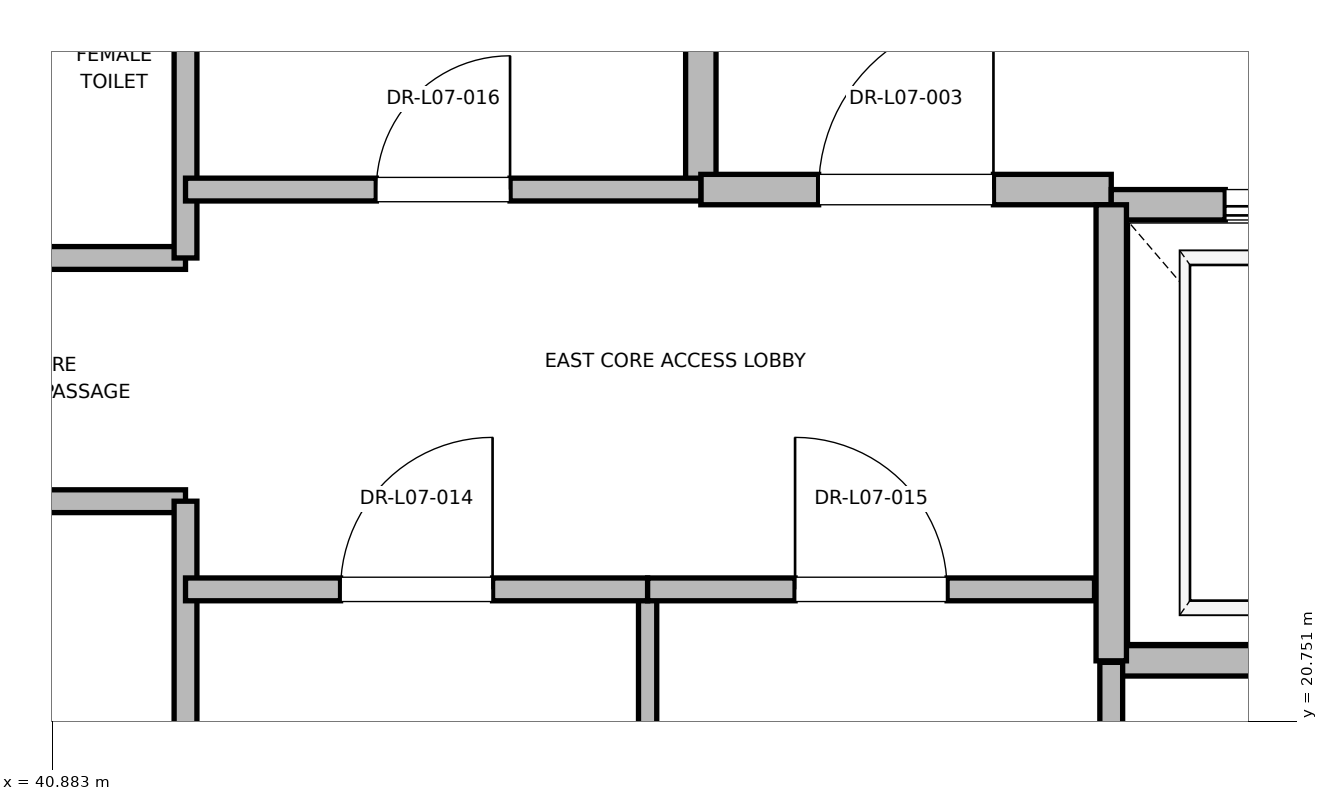
"""IFC4 building model, lengths in metres.
Left out: names, types, materials, properties, quantities, classifications, styles, units other than length and angle.
Written with IfcOpenShell. Run it as: python <this file> out.ifc"""

import sys

from ifc_helpers import new_model, si_unit, direction, frame, frame_2d, origin, place, context, subcontext, project, spatial, rectangle, extrude, element, fill, save


model = new_model("IFC4")
c1 = context("Model", 3, precision=1e-05, world=origin(), true_north=direction((0.0, 1.0)))
c2 = subcontext(c1, "Body", "Model", "MODEL_VIEW")
j1 = project(units=[si_unit("LENGTHUNIT", "METRE"), si_unit("PLANEANGLEUNIT", "RADIAN")], contexts=[c1])
p1 = place(None, origin())
s1 = spatial("IfcSite", under=j1, at=p1, CompositionType="ELEMENT")
p2 = place(p1, origin())
s2 = spatial("IfcBuilding", under=s1, at=p2, CompositionType="ELEMENT")
p3 = place(p2, frame((0.0, 0.0, 35.6)))
s3 = spatial("IfcBuildingStorey", under=s2, at=p3, CompositionType="ELEMENT", Elevation=35.6)
p4 = place(p3, frame((45.15, 24.25, 0.0), z_axis=(0.0, 0.0, 1.0), x_axis=(0.0, 1.0, 0.0)))
e1 = element("IfcWall", 1, at=p4, inside=s3, PredefinedType="PARTITIONING", context=c2, shape_type="SweptSolid", body=[
    extrude(rectangle(XDim=3.37, YDim=0.2, at=frame_2d((1.685, 0.0))), origin(), (0.0, 0.0, 1.0), 3.76),
])
p5 = place(p3, frame((45.15, 24.25, 0.0), z_axis=(0.0, 0.0, 1.0), x_axis=(1.0, 0.0, 0.0)))
e2 = element("IfcWall", 2, at=p5, inside=s3, PredefinedType="PARTITIONING", context=c2, shape_type="SweptSolid", body=[
    extrude(rectangle(XDim=2.7, YDim=0.2, at=frame_2d((1.35, 0.0))), origin(), (0.0, 0.0, 1.0), 3.76),
])
p6 = place(p5, frame((0.775, 0.0, 0.0)))
e3 = element("IfcOpeningElement", 3, at=p6, cuts=e2, PredefinedType="OPENING", context=c2, shape_type="SweptSolid", body=[
    extrude(rectangle(XDim=1.15, YDim=2.2, at=frame_2d((0.575, 1.1))), frame((0.0, 0.1, 0.0), z_axis=(0.0, -1.0, 0.0), x_axis=(1.0, 0.0, 0.0)), (0.0, 0.0, 1.0), 0.2),
])
p7 = place(p3, frame((47.85, 21.15, 0.0), z_axis=(0.0, 0.0, 1.0), x_axis=(1.0, 0.0, 0.0)))
e4 = element("IfcWall", 4, at=p7, inside=s3, PredefinedType="SOLIDWALL", context=c2, shape_type="SweptSolid", body=[
    extrude(rectangle(XDim=2.6, YDim=0.2, at=frame_2d((1.3, 0.0))), origin(), (0.0, 0.0, 1.0), 3.76),
])
p8 = place(p3, frame((50.45, 24.15, 0.0), z_axis=(0.0, 0.0, 1.0), x_axis=(-1.0, 0.0, 0.0)))
e5 = element("IfcWall", 5, at=p8, inside=s3, PredefinedType="SOLIDWALL", context=c2, shape_type="SweptSolid", body=[
    extrude(rectangle(XDim=2.6, YDim=0.2, at=frame_2d((1.3, 0.0))), origin(), (0.0, 0.0, 1.0), 2.54),
])
p9 = place(p8, frame((0.75, 0.0, 0.0)))
e6 = element("IfcOpeningElement", 6, at=p9, cuts=e5, PredefinedType="OPENING", context=c2, shape_type="SweptSolid", body=[
    extrude(rectangle(XDim=1.1, YDim=2.2, at=frame_2d((0.55, 1.1))), frame((0.0, 0.1, 0.0), z_axis=(0.0, -1.0, 0.0), x_axis=(1.0, 0.0, 0.0)), (0.0, 0.0, 1.0), 0.2),
])
p10 = place(p3, frame((47.85, 24.15, 0.0), z_axis=(0.0, 0.0, 1.0), x_axis=(0.0, -1.0, 0.0)))
e7 = element("IfcWall", 7, at=p10, inside=s3, PredefinedType="SOLIDWALL", context=c2, shape_type="SweptSolid", body=[
    extrude(rectangle(XDim=3.0, YDim=0.2, at=frame_2d((1.5, 0.0))), origin(), (0.0, 0.0, 1.0), 3.76),
])
for number, where, z_axis, x_axis in (
    (8, (39.95, 22.2, 0.0), (0.0, 0.0, 1.0), (1.0, 0.0, 0.0)),
    (9, (39.95, 23.8, 0.0), (0.0, 0.0, 1.0), (1.0, 0.0, 0.0)),
):
    element("IfcWall", number, at=place(p3, frame(where, z_axis=z_axis, x_axis=x_axis)), inside=s3, PredefinedType="PARTITIONING", context=c2, shape_type="SweptSolid", body=[
        extrude(rectangle(XDim=1.81, YDim=0.15, at=frame_2d((0.905, 0.0))), origin(), (0.0, 0.0, 1.0), 2.85),
    ])
p11 = place(p3, frame((41.76, 18.6, 0.0), z_axis=(0.0, 0.0, 1.0), x_axis=(0.0, 1.0, 0.0)))
e10 = element("IfcWall", 10, at=p11, inside=s3, PredefinedType="PARTITIONING", context=c2, shape_type="SweptSolid", body=[
    extrude(rectangle(XDim=3.6, YDim=0.15, at=frame_2d((1.8, 0.0))), origin(), (0.0, 0.0, 1.0), 2.54),
])
p12 = place(p3, frame((41.76, 23.8, 0.0), z_axis=(0.0, 0.0, 1.0), x_axis=(0.0, 1.0, 0.0)))
e11 = element("IfcWall", 11, at=p12, inside=s3, PredefinedType="PARTITIONING", context=c2, shape_type="SweptSolid", body=[
    extrude(rectangle(XDim=4.0, YDim=0.15, at=frame_2d((2.0, 0.0))), origin(), (0.0, 0.0, 1.0), 2.85),
])
p13 = place(p3, frame((47.85, 18.6, 0.0), z_axis=(0.0, 0.0, 1.0), x_axis=(0.0, 1.0, 0.0)))
e12 = element("IfcWall", 12, at=p13, inside=s3, PredefinedType="PARTITIONING", context=c2, shape_type="SweptSolid", body=[
    extrude(rectangle(XDim=2.54, YDim=0.15, at=frame_2d((1.27, 0.0))), origin(), (0.0, 0.0, 1.0), 2.85),
])
p14 = place(p3, frame((44.8, 18.6, 0.0), z_axis=(0.0, 0.0, 1.0), x_axis=(0.0, 1.0, 0.0)))
e13 = element("IfcWall", 13, at=p14, inside=s3, PredefinedType="PARTITIONING", context=c2, shape_type="SweptSolid", body=[
    extrude(rectangle(XDim=3.02, YDim=0.12, at=frame_2d((1.51, 0.0))), origin(), (0.0, 0.0, 1.0), 2.85),
])
p15 = place(p3, frame((41.76, 21.62, 0.0), z_axis=(0.0, 0.0, 1.0), x_axis=(1.0, 0.0, 0.0)))
e14 = element("IfcWall", 14, at=p15, inside=s3, PredefinedType="PARTITIONING", context=c2, shape_type="SweptSolid", body=[
    extrude(rectangle(XDim=3.04, YDim=0.15, at=frame_2d((1.52, 0.0))), origin(), (0.0, 0.0, 1.0), 2.85),
])
p16 = place(p15, frame((1.02, 0.0, 0.0)))
e15 = element("IfcOpeningElement", 15, at=p16, cuts=e14, PredefinedType="OPENING", context=c2, shape_type="SweptSolid", body=[
    extrude(rectangle(XDim=1.0, YDim=2.15, at=frame_2d((0.5, 1.075))), frame((0.0, 0.075, 0.0), z_axis=(0.0, -1.0, 0.0), x_axis=(1.0, 0.0, 0.0)), (0.0, 0.0, 1.0), 0.15),
])
p17 = place(p3, frame((44.8, 21.62, 0.0), z_axis=(0.0, 0.0, 1.0), x_axis=(1.0, 0.0, 0.0)))
e16 = element("IfcWall", 16, at=p17, inside=s3, PredefinedType="PARTITIONING", context=c2, shape_type="SweptSolid", body=[
    extrude(rectangle(XDim=2.94, YDim=0.15, at=frame_2d((1.47, 0.0))), origin(), (0.0, 0.0, 1.0), 2.85),
])
p18 = place(p17, frame((0.97, 0.0, 0.0)))
e17 = element("IfcOpeningElement", 17, at=p18, cuts=e16, PredefinedType="OPENING", context=c2, shape_type="SweptSolid", body=[
    extrude(rectangle(XDim=1.0, YDim=2.15, at=frame_2d((0.5, 1.075))), frame((0.0, 0.075, 0.0), z_axis=(0.0, -1.0, 0.0), x_axis=(1.0, 0.0, 0.0)), (0.0, 0.0, 1.0), 0.15),
])
p19 = place(p3, frame((41.76, 24.25, 0.0), z_axis=(0.0, 0.0, 1.0), x_axis=(1.0, 0.0, 0.0)))
e18 = element("IfcWall", 18, at=p19, inside=s3, PredefinedType="PARTITIONING", context=c2, shape_type="SweptSolid", body=[
    extrude(rectangle(XDim=3.39, YDim=0.15, at=frame_2d((1.695, 0.0))), origin(), (0.0, 0.0, 1.0), 2.85),
])
p20 = place(p19, frame((1.255, 0.0, 0.0)))
e19 = element("IfcOpeningElement", 19, at=p20, cuts=e18, PredefinedType="OPENING", context=c2, shape_type="SweptSolid", body=[
    extrude(rectangle(XDim=0.88, YDim=2.1, at=frame_2d((0.44, 1.05))), frame((0.0, 0.075, 0.0), z_axis=(0.0, -1.0, 0.0), x_axis=(1.0, 0.0, 0.0)), (0.0, 0.0, 1.0), 0.15),
])
p21 = place(p6, origin())
e20 = element("IfcDoor", 20, at=p21, inside=s3, OperationType="SINGLE_SWING_RIGHT", PredefinedType="DOOR", context=c2, shape_type="SweptSolid", body=[
    extrude(rectangle(XDim=1.15, YDim=2.2, at=frame_2d((0.575, 1.1))), frame((0.0, 0.025, 0.0), z_axis=(0.0, -1.0, 0.0), x_axis=(1.0, 0.0, 0.0)), (0.0, 0.0, 1.0), 0.05),
])
fill(e3, e20)
p22 = place(p9, origin())
e21 = element("IfcDoor", 21, at=p22, inside=s3, OperationType="SLIDING_TO_RIGHT", PredefinedType="DOOR", context=c2, shape_type="SweptSolid", body=[
    extrude(rectangle(XDim=1.1, YDim=2.2, at=frame_2d((0.55, 1.1))), frame((0.0, 0.025, 0.0), z_axis=(0.0, -1.0, 0.0), x_axis=(1.0, 0.0, 0.0)), (0.0, 0.0, 1.0), 0.05),
])
fill(e6, e21)
p23 = place(p16, origin())
e22 = element("IfcDoor", 22, at=p23, inside=s3, OperationType="SINGLE_SWING_RIGHT", PredefinedType="DOOR", context=c2, shape_type="SweptSolid", body=[
    extrude(rectangle(XDim=1.0, YDim=2.15, at=frame_2d((0.5, 1.075))), frame((0.0, 0.025, 0.0), z_axis=(0.0, -1.0, 0.0), x_axis=(1.0, 0.0, 0.0)), (0.0, 0.0, 1.0), 0.05),
])
fill(e15, e22)
p24 = place(p18, origin())
e23 = element("IfcDoor", 23, at=p24, inside=s3, OperationType="SINGLE_SWING_LEFT", PredefinedType="DOOR", context=c2, shape_type="SweptSolid", body=[
    extrude(rectangle(XDim=1.0, YDim=2.15, at=frame_2d((0.5, 1.075))), frame((0.0, 0.025, 0.0), z_axis=(0.0, -1.0, 0.0), x_axis=(1.0, 0.0, 0.0)), (0.0, 0.0, 1.0), 0.05),
])
fill(e17, e23)
p25 = place(p20, origin())
e24 = element("IfcDoor", 24, at=p25, inside=s3, OperationType="SINGLE_SWING_RIGHT", PredefinedType="DOOR", context=c2, shape_type="SweptSolid", body=[
    extrude(rectangle(XDim=0.88, YDim=2.1, at=frame_2d((0.44, 1.05))), frame((0.0, 0.025, 0.0), z_axis=(0.0, -1.0, 0.0), x_axis=(1.0, 0.0, 0.0)), (0.0, 0.0, 1.0), 0.05),
])
fill(e19, e24)
save(model, sys.argv[1])
